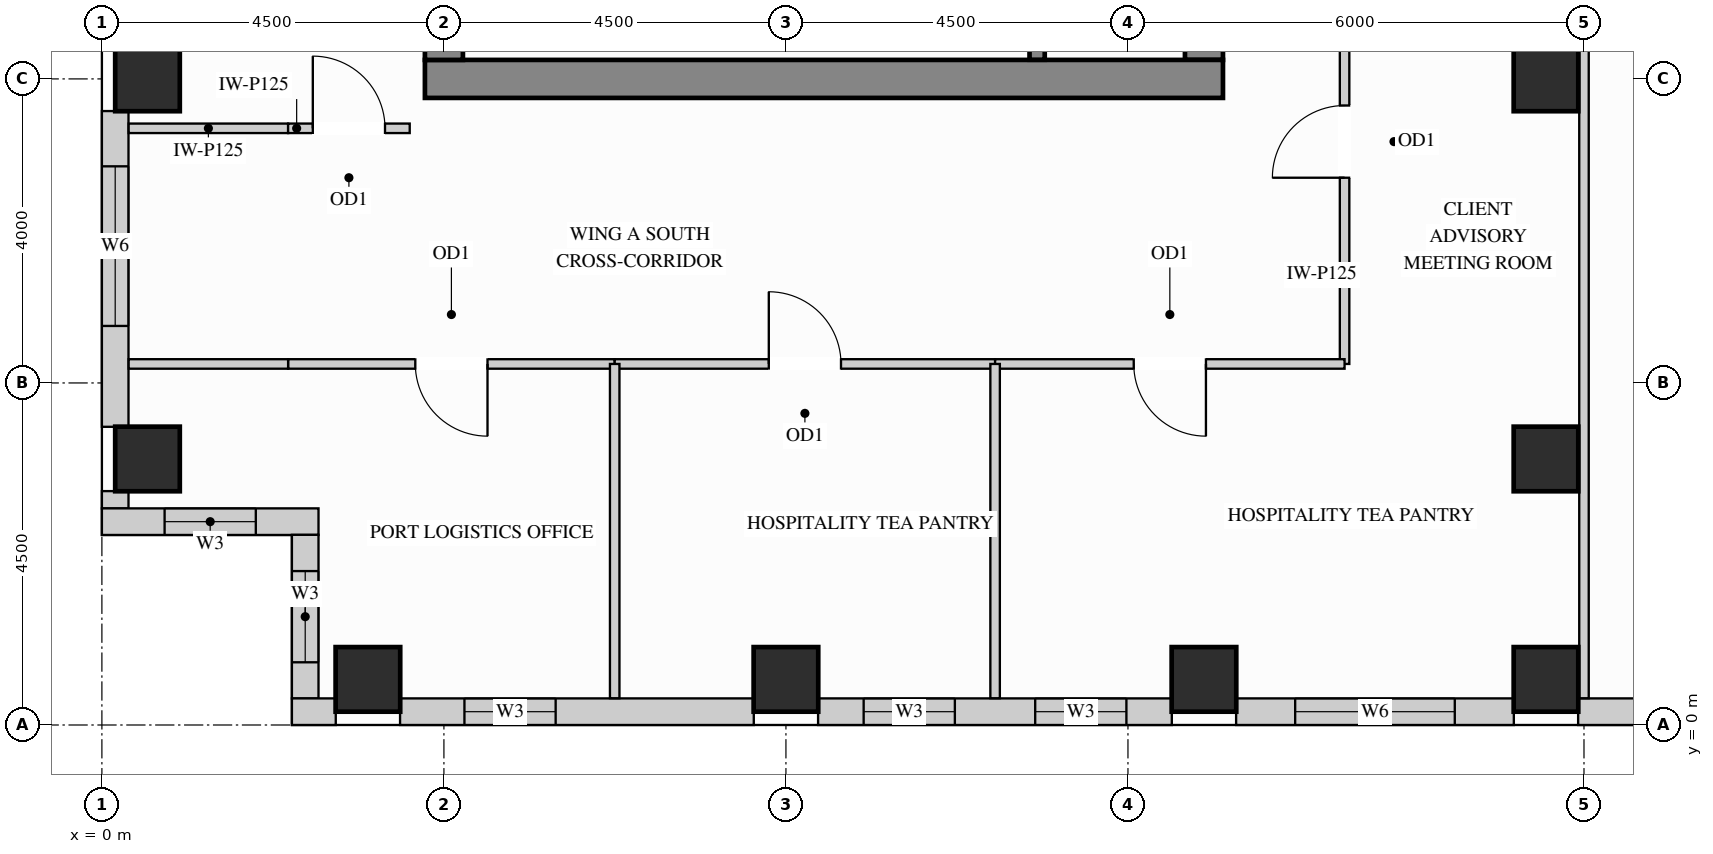
"""IFC4 building model, lengths in metres.
Left out: names, types, materials, properties, quantities, classifications, styles, units other than length and angle.
Written with IfcOpenShell. Run it as: python <this file> out.ifc"""

import sys

from ifc_helpers import new_model, si_unit, direction, frame, frame_2d, origin, origin_2d, place, context, subcontext, project, spatial, rectangle, extrude, source, transform, mapped, element, fill, save


model = new_model("IFC4")
c1 = context("Model", 3, precision=1e-05, world=origin(), true_north=direction((0.0, 1.0)))
c2 = subcontext(c1, "Body", "Model", "MODEL_VIEW")
j1 = project(units=[si_unit("LENGTHUNIT", "METRE"), si_unit("PLANEANGLEUNIT", "RADIAN")], contexts=[c1])
p1 = place(None, origin())
s1 = spatial("IfcSite", under=j1, at=p1, CompositionType="ELEMENT")
p2 = place(p1, origin())
s2 = spatial("IfcBuilding", under=s1, at=p2, CompositionType="ELEMENT")
p3 = place(p2, frame((0.0, 0.0, 262.8)))
s3 = spatial("IfcBuildingStorey", under=s2, at=p3, CompositionType="ELEMENT", Elevation=262.8)
m1 = source(origin(), c2, "Body", "SweptSolid", [
    extrude(rectangle(XDim=0.85, YDim=0.85, at=origin_2d()), origin(), (0.0, 0.0, 1.0), 3.4),
])
for number, where, z_axis, x_axis in (
    (1, (19.0, 3.5, 0.0), (0.0, 0.0, 1.0), (1.0, 0.0, 0.0)),
    (2, (19.0, 8.5, 0.0), (0.0, 0.0, 1.0), (1.0, 0.0, 0.0)),
    (3, (14.5, 0.6, 0.0), (0.0, 0.0, 1.0), (1.0, 0.0, 0.0)),
    (4, (19.0, 0.6, 0.0), (0.0, 0.0, 1.0), (1.0, 0.0, 0.0)),
    (5, (3.5, 0.6, 0.0), (0.0, 0.0, 1.0), (1.0, 0.0, 0.0)),
    (6, (9.0, 0.6, 0.0), (0.0, 0.0, 1.0), (1.0, 0.0, 0.0)),
    (7, (0.6, 3.5, 0.0), (0.0, 0.0, 1.0), (1.0, 0.0, 0.0)),
    (8, (0.6, 8.5, 0.0), (0.0, 0.0, 1.0), (1.0, 0.0, 0.0)),
):
    element("IfcColumn", number, at=place(p3, frame(where, z_axis=z_axis, x_axis=x_axis)), inside=s3, PredefinedType="COLUMN", context=c2, shape_type="MappedRepresentation", body=[
        mapped(m1, transform((0.0, 0.0, 0.0), x_axis=(1.0, 0.0, 0.0), y_axis=(0.0, 1.0, 0.0), z_axis=(0.0, 0.0, 1.0))),
    ])
m2 = source(origin(), c2, "Body", "SweptSolid", [
    extrude(rectangle(XDim=10.07, YDim=0.5, at=frame_2d((5.035, 0.0))), origin(), (0.0, 0.0, 1.0), 3.4),
])
p4 = place(p3, frame((14.5, 8.75, 0.0), z_axis=(0.0, 0.0, 1.0), x_axis=(0.0, 1.0, 0.0)))
e9 = element("IfcWall", 9, at=p4, inside=s3, PredefinedType="SHEAR", context=c2, shape_type="MappedRepresentation", body=[
    mapped(m2, transform((0.0, 0.0, 0.0), x_axis=(1.0, 0.0, 0.0), y_axis=(0.0, 1.0, 0.0), z_axis=(0.0, 0.0, 1.0))),
])
m3 = source(origin(), c2, "Body", "SweptSolid", [
    extrude(rectangle(XDim=10.5, YDim=0.5, at=frame_2d((5.25, 0.0))), origin(), (0.0, 0.0, 1.0), 3.4),
])
p5 = place(p3, frame((4.25, 8.5, 0.0), z_axis=(0.0, 0.0, 1.0), x_axis=(1.0, 0.0, 0.0)))
e10 = element("IfcWall", 10, at=p5, inside=s3, PredefinedType="SHEAR", context=c2, shape_type="MappedRepresentation", body=[
    mapped(m3, transform((0.0, 0.0, 0.0), x_axis=(1.0, 0.0, 0.0), y_axis=(0.0, 1.0, 0.0), z_axis=(0.0, 0.0, 1.0))),
])
m4 = source(origin(), c2, "Body", "SweptSolid", [
    extrude(rectangle(XDim=20.5, YDim=0.5, at=frame_2d((10.25, 0.0))), origin(), (0.0, 0.0, 1.0), 3.4),
])
p6 = place(p3, frame((4.5, 8.75, 0.0), z_axis=(0.0, 0.0, 1.0), x_axis=(0.0, 1.0, 0.0)))
e11 = element("IfcWall", 11, at=p6, inside=s3, PredefinedType="SHEAR", context=c2, shape_type="MappedRepresentation", body=[
    mapped(m4, transform((0.0, 0.0, 0.0), x_axis=(1.0, 0.0, 0.0), y_axis=(0.0, 1.0, 0.0), z_axis=(0.0, 0.0, 1.0))),
])
p7 = place(p3, frame((0.175, 8.077, 0.0), z_axis=(0.0, 0.0, 1.0), x_axis=(0.0, -1.0, 0.0)))
e12 = element("IfcWall", 12, at=p7, inside=s3, PredefinedType="SOLIDWALL", context=c2, shape_type="SweptSolid", body=[
    extrude(rectangle(XDim=4.154, YDim=0.35, at=frame_2d((2.077, 0.0))), origin(), (0.0, 0.0, 1.0), 3.385),
])
p8 = place(p7, frame((0.727, 0.0, 0.78)))
e13 = element("IfcOpeningElement", 13, at=p8, cuts=e12, PredefinedType="OPENING", context=c2, shape_type="SweptSolid", body=[
    extrude(rectangle(XDim=2.1, YDim=2.25, at=frame_2d((1.05, 1.125))), frame((0.0, 0.185, 0.0), z_axis=(0.0, -1.0, 0.0), x_axis=(1.0, 0.0, 0.0)), (0.0, 0.0, 1.0), 0.37),
])
m5 = source(origin(), c2, "Body", "SweptSolid", [
    extrude(rectangle(XDim=0.229, YDim=0.35, at=frame_2d((0.115, 0.0))), origin(), (0.0, 0.0, 1.0), 3.385),
])
p9 = place(p3, frame((0.175, 3.077, 0.0), z_axis=(0.0, 0.0, 1.0), x_axis=(0.0, -1.0, 0.0)))
e14 = element("IfcWall", 14, at=p9, inside=s3, PredefinedType="SOLIDWALL", context=c2, shape_type="MappedRepresentation", body=[
    mapped(m5, transform((0.0, 0.0, 0.0), x_axis=(1.0, 0.0, 0.0), y_axis=(0.0, 1.0, 0.0), z_axis=(0.0, 0.0, 1.0))),
])
p10 = place(p3, frame((0.0, 2.675, 0.0), z_axis=(0.0, 0.0, 1.0), x_axis=(1.0, 0.0, 0.0)))
e15 = element("IfcWall", 15, at=p10, inside=s3, PredefinedType="SOLIDWALL", context=c2, shape_type="SweptSolid", body=[
    extrude(rectangle(XDim=2.85, YDim=0.35, at=frame_2d((1.425, 0.0))), origin(), (0.0, 0.0, 1.0), 3.385),
])
p11 = place(p10, frame((0.825, 0.0, 0.78)))
e16 = element("IfcOpeningElement", 16, at=p11, cuts=e15, PredefinedType="OPENING", context=c2, shape_type="SweptSolid", body=[
    extrude(rectangle(XDim=1.2, YDim=2.25, at=frame_2d((0.6, 1.125))), frame((0.0, 0.185, 0.0), z_axis=(0.0, -1.0, 0.0), x_axis=(1.0, 0.0, 0.0)), (0.0, 0.0, 1.0), 0.37),
])
p12 = place(p3, frame((2.675, 2.502, 0.0), z_axis=(0.0, 0.0, 1.0), x_axis=(0.0, -1.0, 0.0)))
e17 = element("IfcWall", 17, at=p12, inside=s3, PredefinedType="SOLIDWALL", context=c2, shape_type="SweptSolid", body=[
    extrude(rectangle(XDim=2.154, YDim=0.35, at=frame_2d((1.077, 0.0))), origin(), (0.0, 0.0, 1.0), 3.385),
])
p13 = place(p12, frame((0.477, 0.0, 0.78)))
e18 = element("IfcOpeningElement", 18, at=p13, cuts=e17, PredefinedType="OPENING", context=c2, shape_type="SweptSolid", body=[
    extrude(rectangle(XDim=1.2, YDim=2.25, at=frame_2d((0.6, 1.125))), frame((0.0, 0.185, 0.0), z_axis=(0.0, -1.0, 0.0), x_axis=(1.0, 0.0, 0.0)), (0.0, 0.0, 1.0), 0.37),
])
m6 = source(origin(), c2, "Body", "SweptSolid", [
    extrude(rectangle(XDim=0.577, YDim=0.35, at=frame_2d((0.289, 0.0))), origin(), (0.0, 0.0, 1.0), 3.385),
])
p14 = place(p3, frame((2.5, 0.175, 0.0), z_axis=(0.0, 0.0, 1.0), x_axis=(1.0, 0.0, 0.0)))
e19 = element("IfcWall", 19, at=p14, inside=s3, PredefinedType="SOLIDWALL", context=c2, shape_type="MappedRepresentation", body=[
    mapped(m6, transform((0.0, 0.0, 0.0), x_axis=(1.0, 0.0, 0.0), y_axis=(0.0, 1.0, 0.0), z_axis=(0.0, 0.0, 1.0))),
])
p15 = place(p3, frame((3.923, 0.175, 0.0), z_axis=(0.0, 0.0, 1.0), x_axis=(1.0, 0.0, 0.0)))
e20 = element("IfcWall", 20, at=p15, inside=s3, PredefinedType="SOLIDWALL", context=c2, shape_type="SweptSolid", body=[
    extrude(rectangle(XDim=4.654, YDim=0.35, at=frame_2d((2.327, 0.0))), origin(), (0.0, 0.0, 1.0), 3.385),
])
p16 = place(p15, frame((0.847, 0.0, 0.78)))
e21 = element("IfcOpeningElement", 21, at=p16, cuts=e20, PredefinedType="OPENING", context=c2, shape_type="SweptSolid", body=[
    extrude(rectangle(XDim=1.2, YDim=2.25, at=frame_2d((0.6, 1.125))), frame((0.0, 0.185, 0.0), z_axis=(0.0, -1.0, 0.0), x_axis=(1.0, 0.0, 0.0)), (0.0, 0.0, 1.0), 0.37),
])
p17 = place(p3, frame((9.423, 0.175, 0.0), z_axis=(0.0, 0.0, 1.0), x_axis=(1.0, 0.0, 0.0)))
e22 = element("IfcWall", 22, at=p17, inside=s3, PredefinedType="SOLIDWALL", context=c2, shape_type="SweptSolid", body=[
    extrude(rectangle(XDim=4.654, YDim=0.35, at=frame_2d((2.327, 0.0))), origin(), (0.0, 0.0, 1.0), 3.385),
])
p18 = place(p17, frame((0.6, 0.0, 0.78)))
e23 = element("IfcOpeningElement", 23, at=p18, cuts=e22, PredefinedType="OPENING", context=c2, shape_type="SweptSolid", body=[
    extrude(rectangle(XDim=1.2, YDim=2.25, at=frame_2d((0.6, 1.125))), frame((0.0, 0.185, 0.0), z_axis=(0.0, -1.0, 0.0), x_axis=(1.0, 0.0, 0.0)), (0.0, 0.0, 1.0), 0.37),
])
p19 = place(p17, frame((2.856, 0.0, 0.78)))
e24 = element("IfcOpeningElement", 24, at=p19, cuts=e22, PredefinedType="OPENING", context=c2, shape_type="SweptSolid", body=[
    extrude(rectangle(XDim=1.2, YDim=2.25, at=frame_2d((0.6, 1.125))), frame((0.0, 0.185, 0.0), z_axis=(0.0, -1.0, 0.0), x_axis=(1.0, 0.0, 0.0)), (0.0, 0.0, 1.0), 0.37),
])
p20 = place(p3, frame((14.923, 0.175, 0.0), z_axis=(0.0, 0.0, 1.0), x_axis=(1.0, 0.0, 0.0)))
e25 = element("IfcWall", 25, at=p20, inside=s3, PredefinedType="SOLIDWALL", context=c2, shape_type="SweptSolid", body=[
    extrude(rectangle(XDim=3.654, YDim=0.35, at=frame_2d((1.827, 0.0))), origin(), (0.0, 0.0, 1.0), 3.385),
])
p21 = place(p20, frame((0.777, 0.0, 0.78)))
e26 = element("IfcOpeningElement", 26, at=p21, cuts=e25, PredefinedType="OPENING", context=c2, shape_type="SweptSolid", body=[
    extrude(rectangle(XDim=2.1, YDim=2.25, at=frame_2d((1.05, 1.125))), frame((0.0, 0.185, 0.0), z_axis=(0.0, -1.0, 0.0), x_axis=(1.0, 0.0, 0.0)), (0.0, 0.0, 1.0), 0.37),
])
p22 = place(p3, frame((19.423, 0.175, 0.0), z_axis=(0.0, 0.0, 1.0), x_axis=(1.0, 0.0, 0.0)))
e27 = element("IfcWall", 27, at=p22, inside=s3, PredefinedType="SOLIDWALL", context=c2, shape_type="SweptSolid", body=[
    extrude(rectangle(XDim=3.554, YDim=0.35, at=frame_2d((1.777, 0.0))), origin(), (0.0, 0.0, 1.0), 3.385),
])
p23 = place(p22, frame((1.031, 0.0, 0.78)))
e28 = element("IfcOpeningElement", 28, at=p23, cuts=e27, PredefinedType="OPENING", context=c2, shape_type="SweptSolid", body=[
    extrude(rectangle(XDim=1.5, YDim=2.0, at=frame_2d((0.75, 1.0))), frame((0.0, 0.185, 0.0), z_axis=(0.0, -1.0, 0.0), x_axis=(1.0, 0.0, 0.0)), (0.0, 0.0, 1.0), 0.37),
])
p24 = place(p3, frame((16.35, 4.75, 0.0), z_axis=(0.0, 0.0, 1.0), x_axis=(0.0, 1.0, 0.0)))
e29 = element("IfcWall", 29, at=p24, inside=s3, PredefinedType="PARTITIONING", context=c2, shape_type="SweptSolid", body=[
    extrude(rectangle(XDim=5.85, YDim=0.125, at=frame_2d((2.925, 0.0))), origin(), (0.0, 0.0, 1.0), 3.385),
])
p25 = place(p24, frame((2.45, 0.0, 0.0)))
e30 = element("IfcOpeningElement", 30, at=p25, cuts=e29, PredefinedType="OPENING", context=c2, shape_type="SweptSolid", body=[
    extrude(rectangle(XDim=0.95, YDim=2.15, at=frame_2d((0.475, 1.075))), frame((0.0, 0.073, 0.0), z_axis=(0.0, -1.0, 0.0), x_axis=(1.0, 0.0, 0.0)), (0.0, 0.0, 1.0), 0.145),
])
m7 = source(origin(), c2, "Body", "SweptSolid", [
    extrude(rectangle(XDim=2.098, YDim=0.125, at=frame_2d((1.049, 0.0))), origin(), (0.0, 0.0, 1.0), 3.385),
])
p26 = place(p3, frame((0.352, 7.85, 0.0), z_axis=(0.0, 0.0, 1.0), x_axis=(1.0, 0.0, 0.0)))
e31 = element("IfcWall", 31, at=p26, inside=s3, PredefinedType="PARTITIONING", context=c2, shape_type="MappedRepresentation", body=[
    mapped(m7, transform((0.0, 0.0, 0.0), x_axis=(1.0, 0.0, 0.0), y_axis=(0.0, 1.0, 0.0), z_axis=(0.0, 0.0, 1.0))),
])
p27 = place(p3, frame((2.45, 7.85, 0.0), z_axis=(0.0, 0.0, 1.0), x_axis=(1.0, 0.0, 0.0)))
e32 = element("IfcWall", 32, at=p27, inside=s3, PredefinedType="PARTITIONING", context=c2, shape_type="SweptSolid", body=[
    extrude(rectangle(XDim=1.6, YDim=0.125, at=frame_2d((0.8, 0.0))), origin(), (0.0, 0.0, 1.0), 3.385),
])
p28 = place(p27, frame((0.325, 0.0, 0.0)))
e33 = element("IfcOpeningElement", 33, at=p28, cuts=e32, PredefinedType="OPENING", context=c2, shape_type="SweptSolid", body=[
    extrude(rectangle(XDim=0.95, YDim=2.15, at=frame_2d((0.475, 1.075))), frame((0.0, 0.073, 0.0), z_axis=(0.0, -1.0, 0.0), x_axis=(1.0, 0.0, 0.0)), (0.0, 0.0, 1.0), 0.145),
])
m8 = source(origin(), c2, "Body", "SweptSolid", [
    extrude(rectangle(XDim=10.248, YDim=0.125, at=frame_2d((5.124, 0.0))), origin(), (0.0, 0.0, 1.0), 3.385),
])
p29 = place(p3, frame((19.5, 0.352, 0.0), z_axis=(0.0, 0.0, 1.0), x_axis=(0.0, 1.0, 0.0)))
e34 = element("IfcWall", 34, at=p29, inside=s3, PredefinedType="PARTITIONING", context=c2, shape_type="MappedRepresentation", body=[
    mapped(m8, transform((0.0, 0.0, 0.0), x_axis=(1.0, 0.0, 0.0), y_axis=(0.0, 1.0, 0.0), z_axis=(0.0, 0.0, 1.0))),
])
p30 = place(p3, frame((2.45, 4.75, 0.0), z_axis=(0.0, 0.0, 1.0), x_axis=(1.0, 0.0, 0.0)))
e35 = element("IfcWall", 35, at=p30, inside=s3, PredefinedType="PARTITIONING", context=c2, shape_type="SweptSolid", body=[
    extrude(rectangle(XDim=4.297, YDim=0.125, at=frame_2d((2.148, 0.0))), origin(), (0.0, 0.0, 1.0), 2.848),
])
p31 = place(p30, frame((1.674, 0.0, 0.0)))
e36 = element("IfcOpeningElement", 36, at=p31, cuts=e35, PredefinedType="OPENING", context=c2, shape_type="SweptSolid", body=[
    extrude(rectangle(XDim=0.95, YDim=2.15, at=frame_2d((0.475, 1.075))), frame((0.0, 0.073, 0.0), z_axis=(0.0, -1.0, 0.0), x_axis=(1.0, 0.0, 0.0)), (0.0, 0.0, 1.0), 0.145),
])
p32 = place(p3, frame((6.747, 4.75, 0.0), z_axis=(0.0, 0.0, 1.0), x_axis=(1.0, 0.0, 0.0)))
e37 = element("IfcWall", 37, at=p32, inside=s3, PredefinedType="PARTITIONING", context=c2, shape_type="SweptSolid", body=[
    extrude(rectangle(XDim=5.005, YDim=0.125, at=frame_2d((2.502, 0.0))), origin(), (0.0, 0.0, 1.0), 2.848),
])
p33 = place(p32, frame((2.028, 0.0, 0.0)))
e38 = element("IfcOpeningElement", 38, at=p33, cuts=e37, PredefinedType="OPENING", context=c2, shape_type="SweptSolid", body=[
    extrude(rectangle(XDim=0.95, YDim=2.15, at=frame_2d((0.475, 1.075))), frame((0.0, 0.073, 0.0), z_axis=(0.0, -1.0, 0.0), x_axis=(1.0, 0.0, 0.0)), (0.0, 0.0, 1.0), 0.145),
])
p34 = place(p3, frame((11.752, 4.75, 0.0), z_axis=(0.0, 0.0, 1.0), x_axis=(1.0, 0.0, 0.0)))
e39 = element("IfcWall", 39, at=p34, inside=s3, PredefinedType="PARTITIONING", context=c2, shape_type="SweptSolid", body=[
    extrude(rectangle(XDim=4.598, YDim=0.125, at=frame_2d((2.299, 0.0))), origin(), (0.0, 0.0, 1.0), 2.848),
])
p35 = place(p34, frame((1.824, 0.0, 0.0)))
e40 = element("IfcOpeningElement", 40, at=p35, cuts=e39, PredefinedType="OPENING", context=c2, shape_type="SweptSolid", body=[
    extrude(rectangle(XDim=0.95, YDim=2.15, at=frame_2d((0.475, 1.075))), frame((0.0, 0.073, 0.0), z_axis=(0.0, -1.0, 0.0), x_axis=(1.0, 0.0, 0.0)), (0.0, 0.0, 1.0), 0.145),
])
m9 = source(origin(), c2, "Body", "SweptSolid", [
    extrude(rectangle(XDim=2.098, YDim=0.125, at=frame_2d((1.049, 0.0))), origin(), (0.0, 0.0, 1.0), 2.848),
])
p36 = place(p3, frame((0.352, 4.75, 0.0), z_axis=(0.0, 0.0, 1.0), x_axis=(1.0, 0.0, 0.0)))
e41 = element("IfcWall", 41, at=p36, inside=s3, PredefinedType="PARTITIONING", context=c2, shape_type="MappedRepresentation", body=[
    mapped(m9, transform((0.0, 0.0, 0.0), x_axis=(1.0, 0.0, 0.0), y_axis=(0.0, 1.0, 0.0), z_axis=(0.0, 0.0, 1.0))),
])
m10 = source(origin(), c2, "Body", "SweptSolid", [
    extrude(rectangle(XDim=4.398, YDim=0.125, at=frame_2d((2.199, 0.0))), origin(), (0.0, 0.0, 1.0), 3.385),
])
for number, where, z_axis, x_axis in (
    (42, (6.747, 0.352, 0.0), (0.0, 0.0, 1.0), (0.0, 1.0, 0.0)),
    (43, (11.752, 0.352, 0.0), (0.0, 0.0, 1.0), (0.0, 1.0, 0.0)),
):
    element("IfcWall", number, at=place(p3, frame(where, z_axis=z_axis, x_axis=x_axis)), inside=s3, PredefinedType="PARTITIONING", context=c2, shape_type="MappedRepresentation", body=[
        mapped(m10, transform((0.0, 0.0, 0.0), x_axis=(1.0, 0.0, 0.0), y_axis=(0.0, 1.0, 0.0), z_axis=(0.0, 0.0, 1.0))),
    ])
m11 = source(origin(), c2, "Body", "SweptSolid", [
    extrude(rectangle(XDim=3.803, YDim=0.2, at=frame_2d((1.901, 0.0))), origin(), (0.0, 0.0, 1.0), 3.4),
])
p37 = place(p3, frame((12.305, 8.752, 0.0), z_axis=(0.0, 0.0, 1.0), x_axis=(0.0, 1.0, 0.0)))
e44 = element("IfcWall", 44, at=p37, inside=s3, PredefinedType="SHEAR", context=c2, shape_type="MappedRepresentation", body=[
    mapped(m11, transform((0.0, 0.0, 0.0), x_axis=(1.0, 0.0, 0.0), y_axis=(0.0, 1.0, 0.0), z_axis=(0.0, 0.0, 1.0))),
])
m12 = source(origin(), c2, "Body", "SweptSolid", [
    extrude(rectangle(XDim=0.95, YDim=2.15, at=frame_2d((0.475, 1.075))), frame((0.0, 0.025, 0.0), z_axis=(0.0, -1.0, 0.0), x_axis=(1.0, 0.0, 0.0)), (0.0, 0.0, 1.0), 0.05),
])
p38 = place(p25, origin())
e45 = element("IfcDoor", 45, at=p38, inside=s3, OperationType="SINGLE_SWING_LEFT", PredefinedType="DOOR", context=c2, shape_type="MappedRepresentation", body=[
    mapped(m12, transform((0.0, 0.0, 0.0), x_axis=(1.0, 0.0, 0.0), y_axis=(0.0, 1.0, 0.0), z_axis=(0.0, 0.0, 1.0))),
])
fill(e30, e45)
p39 = place(p31, origin())
e46 = element("IfcDoor", 46, at=p39, inside=s3, OperationType="SINGLE_SWING_RIGHT", PredefinedType="DOOR", context=c2, shape_type="MappedRepresentation", body=[
    mapped(m12, transform((0.0, 0.0, 0.0), x_axis=(1.0, 0.0, 0.0), y_axis=(0.0, 1.0, 0.0), z_axis=(0.0, 0.0, 1.0))),
])
fill(e36, e46)
p40 = place(p33, origin())
e47 = element("IfcDoor", 47, at=p40, inside=s3, OperationType="SINGLE_SWING_LEFT", PredefinedType="DOOR", context=c2, shape_type="MappedRepresentation", body=[
    mapped(m12, transform((0.0, 0.0, 0.0), x_axis=(1.0, 0.0, 0.0), y_axis=(0.0, 1.0, 0.0), z_axis=(0.0, 0.0, 1.0))),
])
fill(e38, e47)
p41 = place(p35, origin())
e48 = element("IfcDoor", 48, at=p41, inside=s3, OperationType="SINGLE_SWING_RIGHT", PredefinedType="DOOR", context=c2, shape_type="MappedRepresentation", body=[
    mapped(m12, transform((0.0, 0.0, 0.0), x_axis=(1.0, 0.0, 0.0), y_axis=(0.0, 1.0, 0.0), z_axis=(0.0, 0.0, 1.0))),
])
fill(e40, e48)
p42 = place(p28, origin())
e49 = element("IfcDoor", 49, at=p42, inside=s3, OperationType="SINGLE_SWING_LEFT", PredefinedType="DOOR", context=c2, shape_type="MappedRepresentation", body=[
    mapped(m12, transform((0.0, 0.0, 0.0), x_axis=(1.0, 0.0, 0.0), y_axis=(0.0, 1.0, 0.0), z_axis=(0.0, 0.0, 1.0))),
])
fill(e33, e49)
m13 = source(origin(), c2, "Body", "SweptSolid", [
    extrude(rectangle(XDim=1.2, YDim=2.25, at=frame_2d((0.6, 1.125))), frame((0.0, 0.03, 0.0), z_axis=(0.0, -1.0, 0.0), x_axis=(1.0, 0.0, 0.0)), (0.0, 0.0, 1.0), 0.06),
])
p43 = place(p11, origin())
e50 = element("IfcWindow", 50, at=p43, inside=s3, PartitioningType="SINGLE_PANEL", PredefinedType="WINDOW", context=c2, shape_type="MappedRepresentation", body=[
    mapped(m13, transform((0.0, 0.0, 0.0), x_axis=(1.0, 0.0, 0.0), y_axis=(0.0, 1.0, 0.0), z_axis=(0.0, 0.0, 1.0))),
])
fill(e16, e50)
p44 = place(p13, origin())
e51 = element("IfcWindow", 51, at=p44, inside=s3, PartitioningType="SINGLE_PANEL", PredefinedType="WINDOW", context=c2, shape_type="MappedRepresentation", body=[
    mapped(m13, transform((0.0, 0.0, 0.0), x_axis=(1.0, 0.0, 0.0), y_axis=(0.0, 1.0, 0.0), z_axis=(0.0, 0.0, 1.0))),
])
fill(e18, e51)
p45 = place(p16, origin())
e52 = element("IfcWindow", 52, at=p45, inside=s3, PartitioningType="SINGLE_PANEL", PredefinedType="WINDOW", context=c2, shape_type="MappedRepresentation", body=[
    mapped(m13, transform((0.0, 0.0, 0.0), x_axis=(1.0, 0.0, 0.0), y_axis=(0.0, 1.0, 0.0), z_axis=(0.0, 0.0, 1.0))),
])
fill(e21, e52)
p46 = place(p18, origin())
e53 = element("IfcWindow", 53, at=p46, inside=s3, PartitioningType="SINGLE_PANEL", PredefinedType="WINDOW", context=c2, shape_type="MappedRepresentation", body=[
    mapped(m13, transform((0.0, 0.0, 0.0), x_axis=(1.0, 0.0, 0.0), y_axis=(0.0, 1.0, 0.0), z_axis=(0.0, 0.0, 1.0))),
])
fill(e23, e53)
p47 = place(p19, origin())
e54 = element("IfcWindow", 54, at=p47, inside=s3, PartitioningType="SINGLE_PANEL", PredefinedType="WINDOW", context=c2, shape_type="MappedRepresentation", body=[
    mapped(m13, transform((0.0, 0.0, 0.0), x_axis=(1.0, 0.0, 0.0), y_axis=(0.0, 1.0, 0.0), z_axis=(0.0, 0.0, 1.0))),
])
fill(e24, e54)
m14 = source(origin(), c2, "Body", "SweptSolid", [
    extrude(rectangle(XDim=2.1, YDim=2.25, at=frame_2d((1.05, 1.125))), frame((0.0, 0.03, 0.0), z_axis=(0.0, -1.0, 0.0), x_axis=(1.0, 0.0, 0.0)), (0.0, 0.0, 1.0), 0.06),
])
p48 = place(p8, origin())
e55 = element("IfcWindow", 55, at=p48, inside=s3, PartitioningType="SINGLE_PANEL", PredefinedType="WINDOW", context=c2, shape_type="MappedRepresentation", body=[
    mapped(m14, transform((0.0, 0.0, 0.0), x_axis=(1.0, 0.0, 0.0), y_axis=(0.0, 1.0, 0.0), z_axis=(0.0, 0.0, 1.0))),
])
fill(e13, e55)
p49 = place(p21, origin())
e56 = element("IfcWindow", 56, at=p49, inside=s3, PartitioningType="SINGLE_PANEL", PredefinedType="WINDOW", context=c2, shape_type="MappedRepresentation", body=[
    mapped(m14, transform((0.0, 0.0, 0.0), x_axis=(1.0, 0.0, 0.0), y_axis=(0.0, 1.0, 0.0), z_axis=(0.0, 0.0, 1.0))),
])
fill(e26, e56)
save(model, sys.argv[1])
